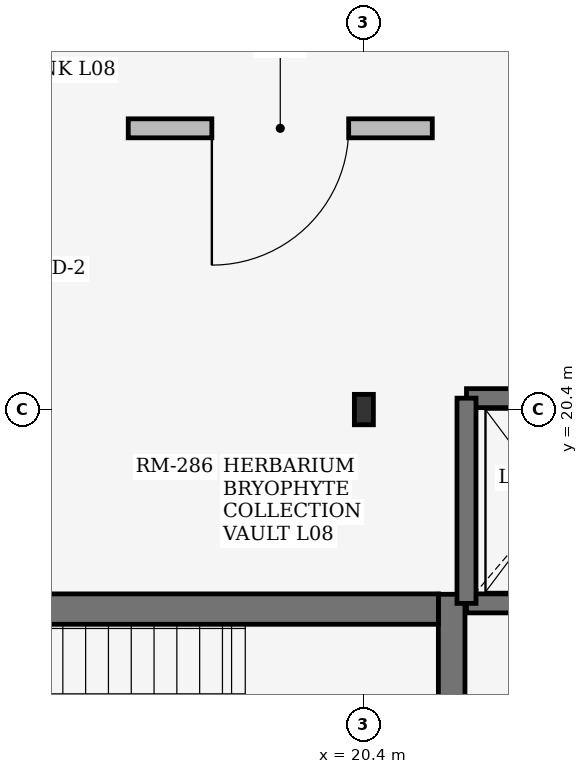
"""IFC4 building model, lengths in metres.
Left out: names, types, materials, properties, quantities, classifications, styles, units other than length and angle.
Written with IfcOpenShell. Run it as: python <this file> out.ifc"""

import sys

from ifc_helpers import new_model, si_unit, direction, frame, frame_2d, origin, origin_2d, place, context, subcontext, project, spatial, rectangle, i_section, extrude, element, fill, save


model = new_model("IFC4")
c1 = context("Model", 3, precision=1e-05, world=origin(), true_north=direction((0.0, 1.0)))
c2 = subcontext(c1, "Body", "Model", "MODEL_VIEW")
j1 = project(units=[si_unit("LENGTHUNIT", "METRE"), si_unit("PLANEANGLEUNIT", "RADIAN")], contexts=[c1])
p1 = place(None, origin())
s1 = spatial("IfcSite", under=j1, at=p1, CompositionType="ELEMENT")
p2 = place(p1, origin())
s2 = spatial("IfcBuilding", under=s1, at=p2, CompositionType="ELEMENT")
p3 = place(p2, frame((0.0, 0.0, 32.7)))
s3 = spatial("IfcBuildingStorey", under=s2, at=p3, CompositionType="ELEMENT", Elevation=32.7)
p4 = place(p3, frame((20.4, 20.4, 0.0), z_axis=(0.0, 0.0, 1.0), x_axis=(1.0, 0.0, 0.0)))
e1 = element("IfcColumn", 1, at=p4, inside=s3, PredefinedType="COLUMN", context=c2, shape_type="SweptSolid", body=[
    extrude(i_section(OverallWidth=0.25, OverallDepth=0.4, WebThickness=0.01, FlangeThickness=0.013, at=origin_2d()), origin(), (0.0, 0.0, 1.0), 3.56),
])
p5 = place(p3, frame((21.555, 13.38, 0.0), z_axis=(0.0, 0.0, 1.0), x_axis=(0.0, 1.0, 0.0)))
e2 = element("IfcWall", 2, at=p5, inside=s3, PredefinedType="SHEAR", context=c2, shape_type="SweptSolid", body=[
    extrude(rectangle(XDim=4.59, YDim=0.35, at=frame_2d((2.295, 0.0))), origin(), (0.0, 0.0, 1.0), 3.56),
])
p6 = place(p3, frame((13.4, 17.775, 0.0), z_axis=(0.0, 0.0, 1.0), x_axis=(1.0, 0.0, 0.0)))
e3 = element("IfcWall", 3, at=p6, inside=s3, PredefinedType="SHEAR", context=c2, shape_type="SweptSolid", body=[
    extrude(rectangle(XDim=7.98, YDim=0.4, at=frame_2d((3.99, 0.0))), origin(), (0.0, 0.0, 1.0), 3.56),
])
p7 = place(p3, frame((21.75, 17.85, 0.0), z_axis=(0.0, 0.0, 1.0), x_axis=(1.0, 0.0, 0.0)))
e4 = element("IfcWall", 4, at=p7, inside=s3, PredefinedType="SHEAR", context=c2, shape_type="SweptSolid", body=[
    extrude(rectangle(XDim=2.3, YDim=0.25, at=frame_2d((1.15, 0.0))), origin(), (0.0, 0.0, 1.0), 3.56),
])
p8 = place(p7, frame((0.6, 0.0, 0.0)))
e5 = element("IfcOpeningElement", 5, at=p8, cuts=e4, PredefinedType="OPENING", context=c2, shape_type="SweptSolid", body=[
    extrude(rectangle(XDim=1.1, YDim=2.2, at=frame_2d((0.55, 1.1))), frame((0.0, 0.135, 0.0), z_axis=(0.0, -1.0, 0.0), x_axis=(1.0, 0.0, 0.0)), (0.0, 0.0, 1.0), 0.27),
])
p9 = place(p3, frame((21.75, 20.55, 0.0), z_axis=(0.0, 0.0, 1.0), x_axis=(1.0, 0.0, 0.0)))
e6 = element("IfcWall", 6, at=p9, inside=s3, PredefinedType="SHEAR", context=c2, shape_type="SweptSolid", body=[
    extrude(rectangle(XDim=2.3, YDim=0.25, at=frame_2d((1.15, 0.0))), origin(), (0.0, 0.0, 1.0), 3.56),
])
p10 = place(p3, frame((21.75, 17.85, 0.0), z_axis=(0.0, 0.0, 1.0), x_axis=(0.0, 1.0, 0.0)))
e7 = element("IfcWall", 7, at=p10, inside=s3, PredefinedType="SHEAR", context=c2, shape_type="SweptSolid", body=[
    extrude(rectangle(XDim=2.7, YDim=0.25, at=frame_2d((1.35, 0.0))), origin(), (0.0, 0.0, 1.0), 3.56),
])
p11 = place(p3, frame((17.3, 24.1, 0.0), z_axis=(0.0, 0.0, 1.0), x_axis=(1.0, 0.0, 0.0)))
e8 = element("IfcWall", 8, at=p11, inside=s3, PredefinedType="SOLIDWALL", context=c2, shape_type="SweptSolid", body=[
    extrude(rectangle(XDim=4.0, YDim=0.25, at=frame_2d((2.0, 0.0))), origin(), (0.0, 0.0, 1.0), 3.54),
])
p12 = place(p11, frame((1.1, 0.0, 0.0)))
e9 = element("IfcOpeningElement", 9, at=p12, cuts=e8, PredefinedType="OPENING", context=c2, shape_type="SweptSolid", body=[
    extrude(rectangle(XDim=1.8, YDim=2.25, at=frame_2d((0.9, 1.125))), frame((0.0, 0.135, 0.0), z_axis=(0.0, -1.0, 0.0), x_axis=(1.0, 0.0, 0.0)), (0.0, 0.0, 1.0), 0.27),
])
p13 = place(p12, frame((1.8, 0.0, 0.0), z_axis=(0.0, 0.0, 1.0), x_axis=(-1.0, 0.0, 0.0)))
e10 = element("IfcDoor", 10, at=p13, inside=s3, OperationType="DOUBLE_DOOR_SINGLE_SWING", PredefinedType="DOOR", context=c2, shape_type="SweptSolid", body=[
    extrude(rectangle(XDim=1.8, YDim=2.25, at=frame_2d((0.9, 1.125))), frame((0.0, 0.025, 0.0), z_axis=(0.0, -1.0, 0.0), x_axis=(1.0, 0.0, 0.0)), (0.0, 0.0, 1.0), 0.05),
])
fill(e9, e10)
save(model, sys.argv[1])
